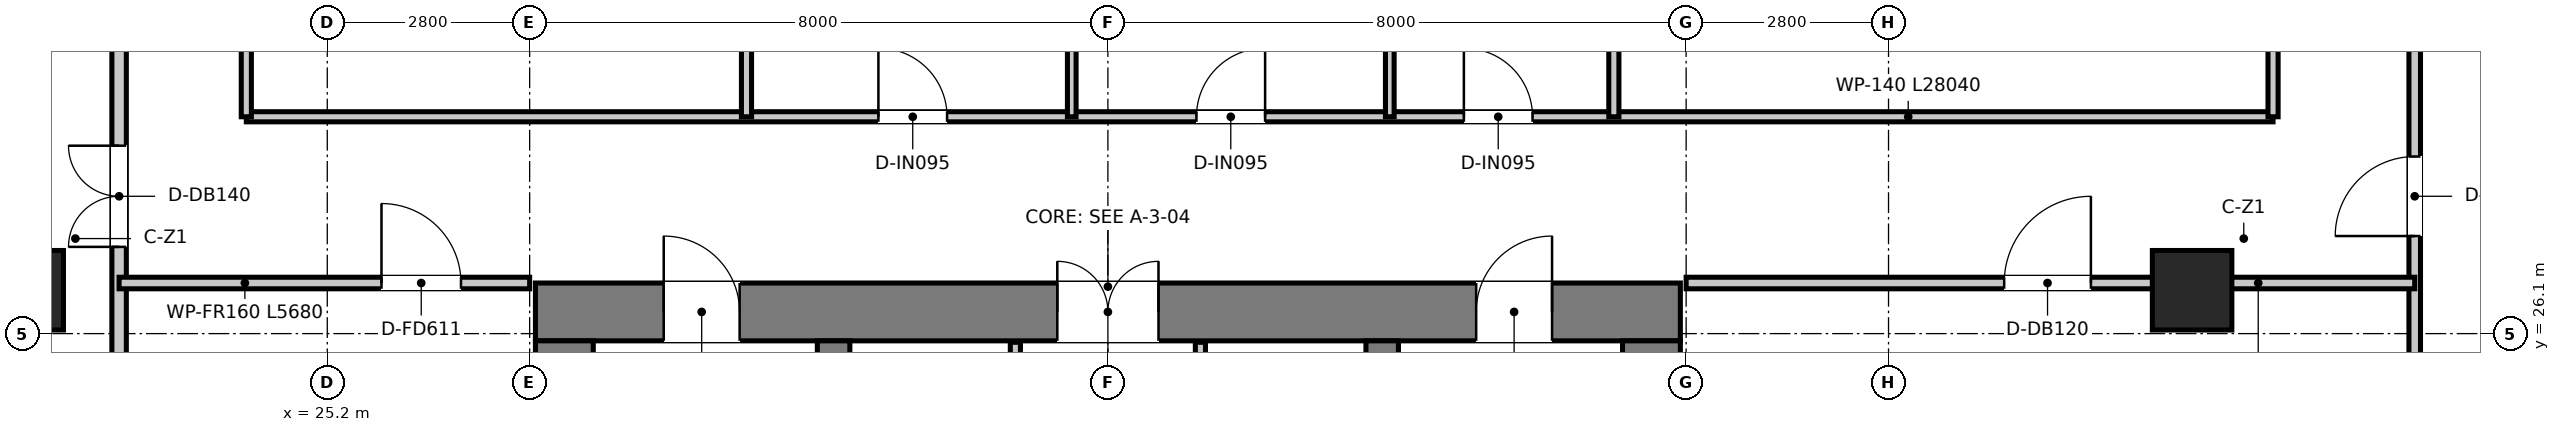
"""IFC4 building model, lengths in metres.
Left out: names, types, materials, properties, quantities, classifications, styles, units other than length and angle.
Written with IfcOpenShell. Run it as: python <this file> out.ifc"""

import sys

from ifc_helpers import new_model, si_unit, direction, frame, frame_2d, origin, origin_2d, place, context, subcontext, project, spatial, rectangle, extrude, source, transform, mapped, element, fill, save


model = new_model("IFC4")
c1 = context("Model", 3, precision=1e-05, world=origin(), true_north=direction((0.0, 1.0)))
c2 = subcontext(c1, "Body", "Model", "MODEL_VIEW")
j1 = project(units=[si_unit("LENGTHUNIT", "METRE"), si_unit("PLANEANGLEUNIT", "RADIAN")], contexts=[c1])
p1 = place(None, origin())
s1 = spatial("IfcSite", under=j1, at=p1, CompositionType="ELEMENT")
p2 = place(p1, origin())
s2 = spatial("IfcBuilding", under=s1, at=p2, CompositionType="ELEMENT")
p3 = place(p2, frame((0.0, 0.0, 15.4)))
s3 = spatial("IfcBuildingStorey", under=s2, at=p3, CompositionType="ELEMENT", Elevation=15.4)
p4 = place(p3, frame((28.08, 26.4, 0.0), z_axis=(0.0, 0.0, 1.0), x_axis=(1.0, 0.0, 0.0)))
e1 = element("IfcWall", 1, at=p4, inside=s3, PredefinedType="SHEAR", context=c2, shape_type="SweptSolid", body=[
    extrude(rectangle(XDim=15.84, YDim=0.8, at=frame_2d((7.92, 0.0))), origin(), (0.0, 0.0, 1.0), 4.6),
])
p5 = place(p4, frame((7.22, 0.0, 0.0)))
e2 = element("IfcOpeningElement", 2, at=p5, cuts=e1, PredefinedType="OPENING", context=c2, shape_type="SweptSolid", body=[
    extrude(rectangle(XDim=1.4, YDim=2.2, at=frame_2d((0.7, 1.1))), frame((0.0, 0.41, 0.0), z_axis=(0.0, -1.0, 0.0), x_axis=(1.0, 0.0, 0.0)), (0.0, 0.0, 1.0), 0.82),
])
p6 = place(p4, frame((1.775, 0.0, 0.0)))
e3 = element("IfcOpeningElement", 3, at=p6, cuts=e1, PredefinedType="OPENING", context=c2, shape_type="SweptSolid", body=[
    extrude(rectangle(XDim=1.05, YDim=2.1, at=frame_2d((0.525, 1.05))), frame((0.0, 0.41, 0.0), z_axis=(0.0, -1.0, 0.0), x_axis=(1.0, 0.0, 0.0)), (0.0, 0.0, 1.0), 0.82),
])
p7 = place(p4, frame((13.015, 0.0, 0.0)))
e4 = element("IfcOpeningElement", 4, at=p7, cuts=e1, PredefinedType="OPENING", context=c2, shape_type="SweptSolid", body=[
    extrude(rectangle(XDim=1.05, YDim=2.1, at=frame_2d((0.525, 1.05))), frame((0.0, 0.41, 0.0), z_axis=(0.0, -1.0, 0.0), x_axis=(1.0, 0.0, 0.0)), (0.0, 0.0, 1.0), 0.82),
])
for number, where, z_axis, x_axis in (
    (5, (28.48, 11.3, 0.0), (0.0, 0.0, 1.0), (0.0, 1.0, 0.0)),
    (6, (43.52, 11.3, 0.0), (0.0, 0.0, 1.0), (0.0, 1.0, 0.0)),
):
    element("IfcWall", number, at=place(p3, frame(where, z_axis=z_axis, x_axis=x_axis)), inside=s3, PredefinedType="SHEAR", context=c2, shape_type="SweptSolid", body=[
        extrude(rectangle(XDim=14.7, YDim=0.8, at=frame_2d((7.35, 0.0))), origin(), (0.0, 0.0, 1.0), 4.6),
    ])
p8 = place(p3, frame((32.205, 13.22, 0.0), z_axis=(0.0, 0.0, 1.0), x_axis=(0.0, 1.0, 0.0)))
e7 = element("IfcWall", 7, at=p8, inside=s3, PredefinedType="SHEAR", context=c2, shape_type="SweptSolid", body=[
    extrude(rectangle(XDim=12.78, YDim=0.45, at=frame_2d((6.39, 0.0))), origin(), (0.0, 0.0, 1.0), 4.6),
])
p9 = place(p8, frame((10.58, 0.0, 0.0)))
e8 = element("IfcOpeningElement", 8, at=p9, cuts=e7, PredefinedType="OPENING", context=c2, shape_type="SweptSolid", body=[
    extrude(rectangle(XDim=1.1, YDim=2.15, at=frame_2d((0.55, 1.075))), frame((0.0, 0.235, 0.0), z_axis=(0.0, -1.0, 0.0), x_axis=(1.0, 0.0, 0.0)), (0.0, 0.0, 1.0), 0.47),
])
p10 = place(p3, frame((39.795, 13.22, 0.0), z_axis=(0.0, 0.0, 1.0), x_axis=(0.0, 1.0, 0.0)))
e9 = element("IfcWall", 9, at=p10, inside=s3, PredefinedType="SHEAR", context=c2, shape_type="SweptSolid", body=[
    extrude(rectangle(XDim=12.78, YDim=0.45, at=frame_2d((6.39, 0.0))), origin(), (0.0, 0.0, 1.0), 4.6),
])
p11 = place(p10, frame((10.58, 0.0, 0.0)))
e10 = element("IfcOpeningElement", 10, at=p11, cuts=e9, PredefinedType="OPENING", context=c2, shape_type="SweptSolid", body=[
    extrude(rectangle(XDim=1.1, YDim=2.15, at=frame_2d((0.55, 1.075))), frame((0.0, 0.235, 0.0), z_axis=(0.0, -1.0, 0.0), x_axis=(1.0, 0.0, 0.0)), (0.0, 0.0, 1.0), 0.47),
])
m1 = source(origin(), c2, "Body", "SweptSolid", [
    extrude(rectangle(XDim=1.1, YDim=1.1, at=origin_2d()), origin(), (0.0, 0.0, 1.0), 4.6),
])
for number, where, z_axis, x_axis in (
    (11, (21.0, 26.7, 0.0), (0.0, 0.0, 1.0), (1.0, 0.0, 0.0)),
    (12, (51.0, 26.7, 0.0), (0.0, 0.0, 1.0), (1.0, 0.0, 0.0)),
):
    element("IfcColumn", number, at=place(p3, frame(where, z_axis=z_axis, x_axis=x_axis)), inside=s3, PredefinedType="COLUMN", context=c2, shape_type="MappedRepresentation", body=[
        mapped(m1, transform((0.0, 0.0, 0.0), x_axis=(1.0, 0.0, 0.0), y_axis=(0.0, 1.0, 0.0), z_axis=(0.0, 0.0, 1.0), scale=1.0)),
    ])
p12 = place(p3, frame((34.72, 20.2, 0.0), z_axis=(0.0, 0.0, 1.0), x_axis=(0.0, 1.0, 0.0)))
e13 = element("IfcWall", 13, at=p12, inside=s3, PredefinedType="PARTITIONING", context=c2, shape_type="SweptSolid", body=[
    extrude(rectangle(XDim=5.78, YDim=0.14, at=frame_2d((2.89, 0.0))), origin(), (0.0, 0.0, 1.0), 3.05),
])
p13 = place(p12, frame((1.05, 0.0, 0.0)))
e14 = element("IfcOpeningElement", 14, at=p13, cuts=e13, PredefinedType="OPENING", context=c2, shape_type="SweptSolid", body=[
    extrude(rectangle(XDim=0.9, YDim=2.1, at=frame_2d((0.45, 1.05))), frame((0.0, 0.08, 0.0), z_axis=(0.0, -1.0, 0.0), x_axis=(1.0, 0.0, 0.0)), (0.0, 0.0, 1.0), 0.16),
])
p14 = place(p3, frame((37.28, 20.2, 0.0), z_axis=(0.0, 0.0, 1.0), x_axis=(0.0, 1.0, 0.0)))
e15 = element("IfcWall", 15, at=p14, inside=s3, PredefinedType="PARTITIONING", context=c2, shape_type="SweptSolid", body=[
    extrude(rectangle(XDim=5.78, YDim=0.14, at=frame_2d((2.89, 0.0))), origin(), (0.0, 0.0, 1.0), 3.05),
])
p15 = place(p14, frame((0.95, 0.0, 0.0)))
e16 = element("IfcOpeningElement", 16, at=p15, cuts=e15, PredefinedType="OPENING", context=c2, shape_type="SweptSolid", body=[
    extrude(rectangle(XDim=1.1, YDim=2.15, at=frame_2d((0.55, 1.075))), frame((0.0, 0.08, 0.0), z_axis=(0.0, -1.0, 0.0), x_axis=(1.0, 0.0, 0.0)), (0.0, 0.0, 1.0), 0.16),
])
p16 = place(p3, frame((24.08, 29.1, 0.0), z_axis=(0.0, 0.0, 1.0), x_axis=(1.0, 0.0, 0.0)))
e17 = element("IfcWall", 17, at=p16, inside=s3, PredefinedType="PARTITIONING", context=c2, shape_type="SweptSolid", body=[
    extrude(rectangle(XDim=28.04, YDim=0.14, at=frame_2d((14.02, 0.0))), origin(), (0.0, 0.0, 1.0), 3.45),
])
p17 = place(p16, frame((8.745, 0.0, 0.0)))
e18 = element("IfcOpeningElement", 18, at=p17, cuts=e17, PredefinedType="OPENING", context=c2, shape_type="SweptSolid", body=[
    extrude(rectangle(XDim=0.95, YDim=2.1, at=frame_2d((0.475, 1.05))), frame((0.0, 0.08, 0.0), z_axis=(0.0, -1.0, 0.0), x_axis=(1.0, 0.0, 0.0)), (0.0, 0.0, 1.0), 0.16),
])
p18 = place(p16, frame((13.145, 0.0, 0.0)))
e19 = element("IfcOpeningElement", 19, at=p18, cuts=e17, PredefinedType="OPENING", context=c2, shape_type="SweptSolid", body=[
    extrude(rectangle(XDim=0.95, YDim=2.1, at=frame_2d((0.475, 1.05))), frame((0.0, 0.08, 0.0), z_axis=(0.0, -1.0, 0.0), x_axis=(1.0, 0.0, 0.0)), (0.0, 0.0, 1.0), 0.16),
])
p19 = place(p16, frame((16.845, 0.0, 0.0)))
e20 = element("IfcOpeningElement", 20, at=p19, cuts=e17, PredefinedType="OPENING", context=c2, shape_type="SweptSolid", body=[
    extrude(rectangle(XDim=0.95, YDim=2.1, at=frame_2d((0.475, 1.05))), frame((0.0, 0.08, 0.0), z_axis=(0.0, -1.0, 0.0), x_axis=(1.0, 0.0, 0.0)), (0.0, 0.0, 1.0), 0.16),
])
p20 = place(p3, frame((22.32, 0.605, 0.0), z_axis=(0.0, 0.0, 1.0), x_axis=(0.0, 1.0, 0.0)))
e21 = element("IfcWall", 21, at=p20, inside=s3, PredefinedType="PARTITIONING", context=c2, shape_type="SweptSolid", body=[
    extrude(rectangle(XDim=49.215, YDim=0.2, at=frame_2d((24.607, 0.0))), origin(), (0.0, 0.0, 1.0), 3.55),
])
p21 = place(p20, frame((26.695, 0.0, 0.0)))
e22 = element("IfcOpeningElement", 22, at=p21, cuts=e21, PredefinedType="OPENING", context=c2, shape_type="SweptSolid", body=[
    extrude(rectangle(XDim=1.4, YDim=2.2, at=frame_2d((0.7, 1.1))), frame((0.0, 0.11, 0.0), z_axis=(0.0, -1.0, 0.0), x_axis=(1.0, 0.0, 0.0)), (0.0, 0.0, 1.0), 0.22),
])
p22 = place(p3, frame((24.08, 29.1, 0.0), z_axis=(0.0, 0.0, 1.0), x_axis=(0.0, 1.0, 0.0)))
e23 = element("IfcWall", 23, at=p22, inside=s3, PredefinedType="PARTITIONING", context=c2, shape_type="SweptSolid", body=[
    extrude(rectangle(XDim=20.72, YDim=0.14, at=frame_2d((10.36, 0.0))), origin(), (0.0, 0.0, 1.0), 3.55),
])
p23 = place(p22, frame((11.2, 0.0, 0.0)))
e24 = element("IfcOpeningElement", 24, at=p23, cuts=e23, PredefinedType="OPENING", context=c2, shape_type="SweptSolid", body=[
    extrude(rectangle(XDim=1.4, YDim=2.2, at=frame_2d((0.7, 1.1))), frame((0.0, 0.08, 0.0), z_axis=(0.0, -1.0, 0.0), x_axis=(1.0, 0.0, 0.0)), (0.0, 0.0, 1.0), 0.16),
])
p24 = place(p3, frame((52.12, 29.1, 0.0), z_axis=(0.0, 0.0, 1.0), x_axis=(0.0, 1.0, 0.0)))
e25 = element("IfcWall", 25, at=p24, inside=s3, PredefinedType="PARTITIONING", context=c2, shape_type="SweptSolid", body=[
    extrude(rectangle(XDim=20.72, YDim=0.14, at=frame_2d((10.36, 0.0))), origin(), (0.0, 0.0, 1.0), 3.61),
])
p25 = place(p3, frame((54.08, 0.605, 0.0), z_axis=(0.0, 0.0, 1.0), x_axis=(0.0, 1.0, 0.0)))
e26 = element("IfcWall", 26, at=p25, inside=s3, PredefinedType="PARTITIONING", context=c2, shape_type="SweptSolid", body=[
    extrude(rectangle(XDim=49.215, YDim=0.16, at=frame_2d((24.607, 0.0))), origin(), (0.0, 0.0, 1.0), 3.61),
])
p26 = place(p25, frame((26.845, 0.0, 0.0)))
e27 = element("IfcOpeningElement", 27, at=p26, cuts=e26, PredefinedType="OPENING", context=c2, shape_type="SweptSolid", body=[
    extrude(rectangle(XDim=1.1, YDim=2.15, at=frame_2d((0.55, 1.075))), frame((0.0, 0.09, 0.0), z_axis=(0.0, -1.0, 0.0), x_axis=(1.0, 0.0, 0.0)), (0.0, 0.0, 1.0), 0.18),
])
for number, where, z_axis, x_axis in (
    (28, (31.0, 29.1, 0.0), (0.0, 0.0, 1.0), (0.0, 1.0, 0.0)),
    (29, (43.0, 29.1, 0.0), (0.0, 0.0, 1.0), (0.0, 1.0, 0.0)),
):
    element("IfcWall", number, at=place(p3, frame(where, z_axis=z_axis, x_axis=x_axis)), inside=s3, PredefinedType="PARTITIONING", context=c2, shape_type="SweptSolid", body=[
        extrude(rectangle(XDim=4.4, YDim=0.14, at=frame_2d((2.2, 0.0))), origin(), (0.0, 0.0, 1.0), 3.7),
    ])
for number, where, z_axis, x_axis in (
    (30, (35.5, 29.1, 0.0), (0.0, 0.0, 1.0), (0.0, 1.0, 0.0)),
    (31, (39.9, 29.1, 0.0), (0.0, 0.0, 1.0), (0.0, 1.0, 0.0)),
):
    element("IfcWall", number, at=place(p3, frame(where, z_axis=z_axis, x_axis=x_axis)), inside=s3, PredefinedType="PARTITIONING", context=c2, shape_type="SweptSolid", body=[
        extrude(rectangle(XDim=4.4, YDim=0.12, at=frame_2d((2.2, 0.0))), origin(), (0.0, 0.0, 1.0), 3.7),
    ])
p27 = place(p3, frame((22.32, 26.8, 0.0), z_axis=(0.0, 0.0, 1.0), x_axis=(1.0, 0.0, 0.0)))
e32 = element("IfcWall", 32, at=p27, inside=s3, PredefinedType="PARTITIONING", context=c2, shape_type="SweptSolid", body=[
    extrude(rectangle(XDim=5.68, YDim=0.16, at=frame_2d((2.84, 0.0))), origin(), (0.0, 0.0, 1.0), 3.45),
])
p28 = place(p27, frame((3.63, 0.0, 0.0)))
e33 = element("IfcOpeningElement", 33, at=p28, cuts=e32, PredefinedType="OPENING", context=c2, shape_type="SweptSolid", body=[
    extrude(rectangle(XDim=1.1, YDim=2.15, at=frame_2d((0.55, 1.075))), frame((0.0, 0.09, 0.0), z_axis=(0.0, -1.0, 0.0), x_axis=(1.0, 0.0, 0.0)), (0.0, 0.0, 1.0), 0.18),
])
p29 = place(p3, frame((44.0, 26.8, 0.0), z_axis=(0.0, 0.0, 1.0), x_axis=(1.0, 0.0, 0.0)))
e34 = element("IfcWall", 34, at=p29, inside=s3, PredefinedType="PARTITIONING", context=c2, shape_type="SweptSolid", body=[
    extrude(rectangle(XDim=10.08, YDim=0.16, at=frame_2d((5.04, 0.0))), origin(), (0.0, 0.0, 1.0), 3.45),
])
p30 = place(p29, frame((4.4, 0.0, 0.0)))
e35 = element("IfcOpeningElement", 35, at=p30, cuts=e34, PredefinedType="OPENING", context=c2, shape_type="SweptSolid", body=[
    extrude(rectangle(XDim=1.2, YDim=2.15, at=frame_2d((0.6, 1.075))), frame((0.0, 0.09, 0.0), z_axis=(0.0, -1.0, 0.0), x_axis=(1.0, 0.0, 0.0)), (0.0, 0.0, 1.0), 0.18),
])
p31 = place(p5, origin())
e36 = element("IfcDoor", 36, at=p31, inside=s3, OperationType="DOUBLE_DOOR_SINGLE_SWING", PredefinedType="DOOR", context=c2, shape_type="SweptSolid", body=[
    extrude(rectangle(XDim=1.4, YDim=2.2, at=frame_2d((0.7, 1.1))), frame((0.0, 0.025, 0.0), z_axis=(0.0, -1.0, 0.0), x_axis=(1.0, 0.0, 0.0)), (0.0, 0.0, 1.0), 0.05),
])
fill(e2, e36)
p32 = place(p6, origin())
e37 = element("IfcDoor", 37, at=p32, inside=s3, OperationType="SINGLE_SWING_LEFT", PredefinedType="DOOR", context=c2, shape_type="SweptSolid", body=[
    extrude(rectangle(XDim=1.05, YDim=2.1, at=frame_2d((0.525, 1.05))), frame((0.0, 0.025, 0.0), z_axis=(0.0, -1.0, 0.0), x_axis=(1.0, 0.0, 0.0)), (0.0, 0.0, 1.0), 0.05),
])
fill(e3, e37)
p33 = place(p7, origin())
e38 = element("IfcDoor", 38, at=p33, inside=s3, OperationType="SINGLE_SWING_RIGHT", PredefinedType="DOOR", context=c2, shape_type="SweptSolid", body=[
    extrude(rectangle(XDim=1.05, YDim=2.1, at=frame_2d((0.525, 1.05))), frame((0.0, 0.025, 0.0), z_axis=(0.0, -1.0, 0.0), x_axis=(1.0, 0.0, 0.0)), (0.0, 0.0, 1.0), 0.05),
])
fill(e4, e38)
p34 = place(p17, origin())
e39 = element("IfcDoor", 39, at=p34, inside=s3, OperationType="SINGLE_SWING_LEFT", PredefinedType="DOOR", context=c2, shape_type="SweptSolid", body=[
    extrude(rectangle(XDim=0.95, YDim=2.1, at=frame_2d((0.475, 1.05))), frame((0.0, 0.025, 0.0), z_axis=(0.0, -1.0, 0.0), x_axis=(1.0, 0.0, 0.0)), (0.0, 0.0, 1.0), 0.05),
])
fill(e18, e39)
p35 = place(p18, origin())
e40 = element("IfcDoor", 40, at=p35, inside=s3, OperationType="SINGLE_SWING_RIGHT", PredefinedType="DOOR", context=c2, shape_type="SweptSolid", body=[
    extrude(rectangle(XDim=0.95, YDim=2.1, at=frame_2d((0.475, 1.05))), frame((0.0, 0.025, 0.0), z_axis=(0.0, -1.0, 0.0), x_axis=(1.0, 0.0, 0.0)), (0.0, 0.0, 1.0), 0.05),
])
fill(e19, e40)
p36 = place(p19, origin())
e41 = element("IfcDoor", 41, at=p36, inside=s3, OperationType="SINGLE_SWING_LEFT", PredefinedType="DOOR", context=c2, shape_type="SweptSolid", body=[
    extrude(rectangle(XDim=0.95, YDim=2.1, at=frame_2d((0.475, 1.05))), frame((0.0, 0.025, 0.0), z_axis=(0.0, -1.0, 0.0), x_axis=(1.0, 0.0, 0.0)), (0.0, 0.0, 1.0), 0.05),
])
fill(e20, e41)
p37 = place(p21, origin())
e42 = element("IfcDoor", 42, at=p37, inside=s3, OperationType="DOUBLE_DOOR_SINGLE_SWING", PredefinedType="DOOR", context=c2, shape_type="SweptSolid", body=[
    extrude(rectangle(XDim=1.4, YDim=2.2, at=frame_2d((0.7, 1.1))), frame((0.0, 0.025, 0.0), z_axis=(0.0, -1.0, 0.0), x_axis=(1.0, 0.0, 0.0)), (0.0, 0.0, 1.0), 0.05),
])
fill(e22, e42)
p38 = place(p28, origin())
e43 = element("IfcDoor", 43, at=p38, inside=s3, OperationType="SINGLE_SWING_LEFT", PredefinedType="DOOR", context=c2, shape_type="SweptSolid", body=[
    extrude(rectangle(XDim=1.1, YDim=2.15, at=frame_2d((0.55, 1.075))), frame((0.0, 0.025, 0.0), z_axis=(0.0, -1.0, 0.0), x_axis=(1.0, 0.0, 0.0)), (0.0, 0.0, 1.0), 0.05),
])
fill(e33, e43)
p39 = place(p30, origin())
e44 = element("IfcDoor", 44, at=p39, inside=s3, OperationType="SINGLE_SWING_RIGHT", PredefinedType="DOOR", context=c2, shape_type="SweptSolid", body=[
    extrude(rectangle(XDim=1.2, YDim=2.15, at=frame_2d((0.6, 1.075))), frame((0.0, 0.025, 0.0), z_axis=(0.0, -1.0, 0.0), x_axis=(1.0, 0.0, 0.0)), (0.0, 0.0, 1.0), 0.05),
])
fill(e35, e44)
p40 = place(p26, origin())
e45 = element("IfcDoor", 45, at=p40, inside=s3, OperationType="SINGLE_SWING_LEFT", PredefinedType="DOOR", context=c2, shape_type="SweptSolid", body=[
    extrude(rectangle(XDim=1.1, YDim=2.15, at=frame_2d((0.55, 1.075))), frame((0.0, 0.025, 0.0), z_axis=(0.0, -1.0, 0.0), x_axis=(1.0, 0.0, 0.0)), (0.0, 0.0, 1.0), 0.05),
])
fill(e27, e45)
save(model, sys.argv[1])
